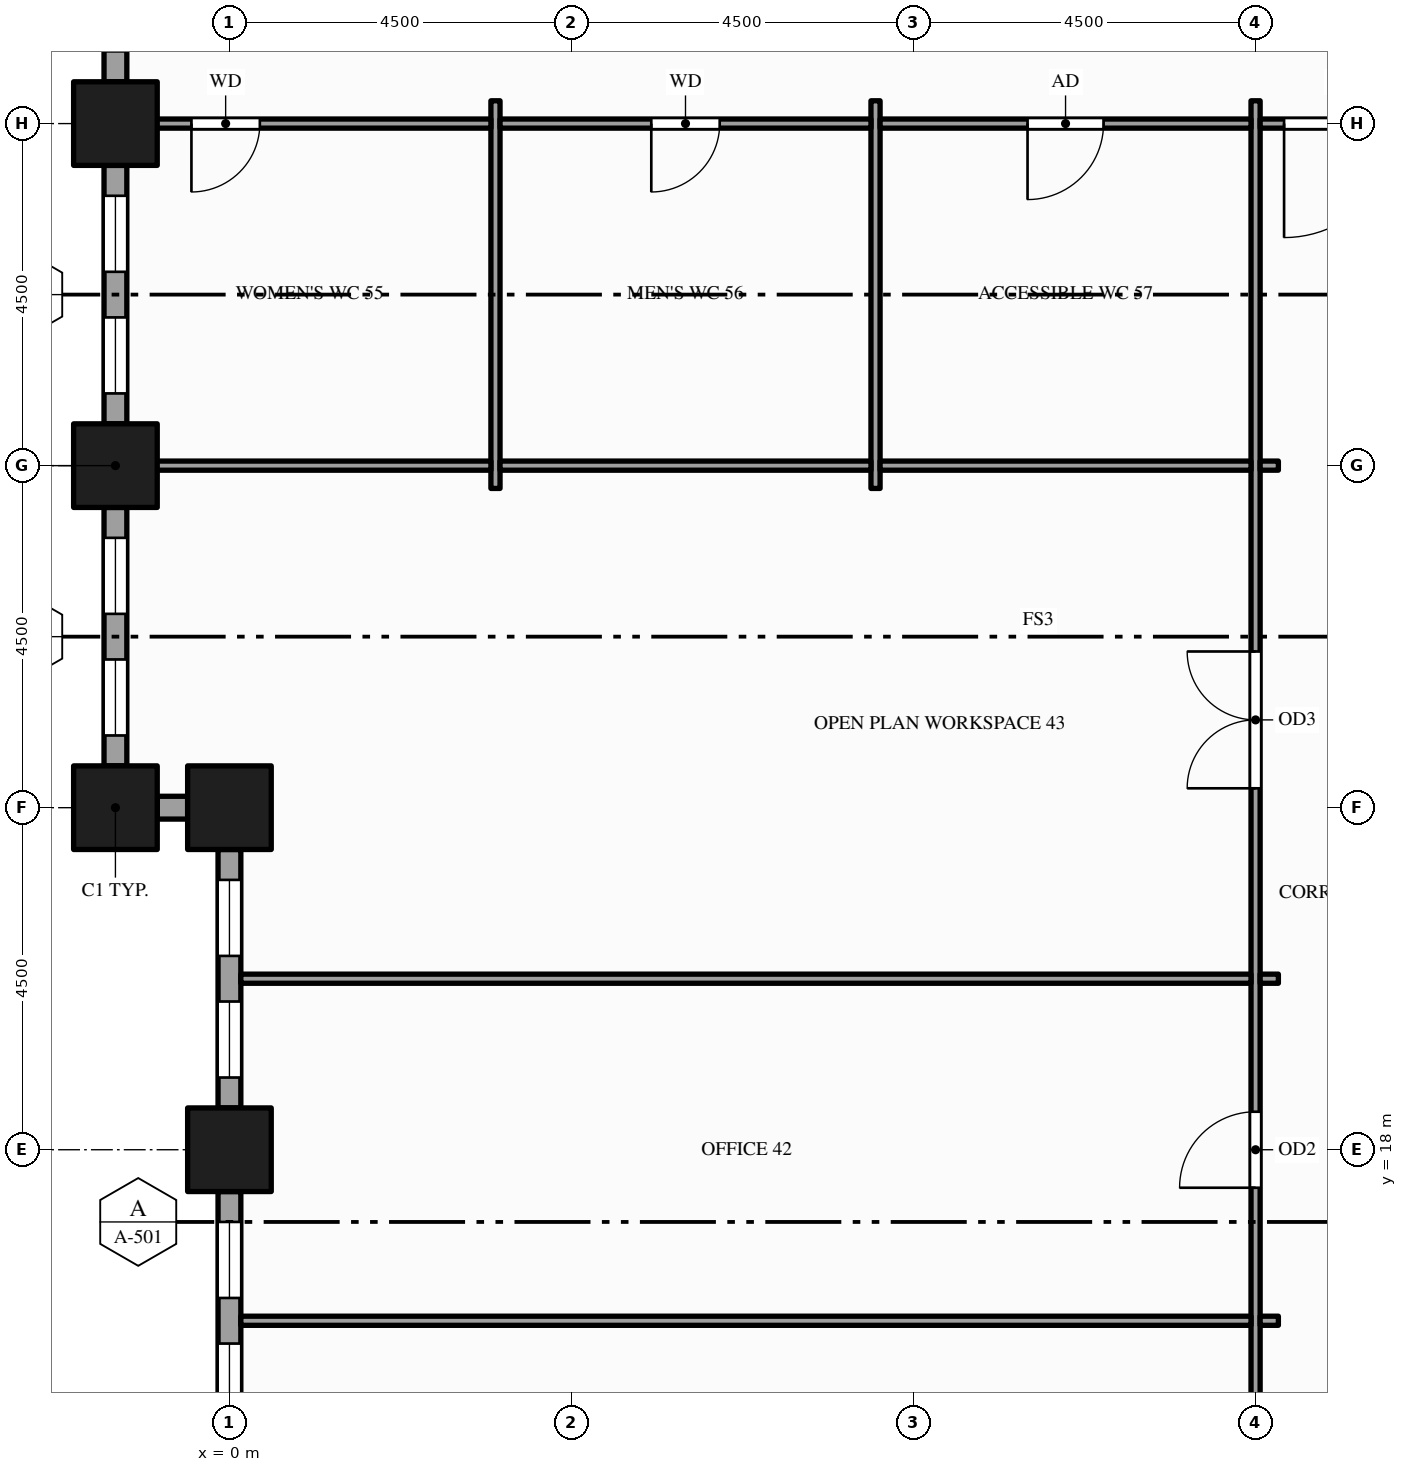
"""IFC4 building model, lengths in metres.
Left out: names, types, materials, properties, quantities, classifications, styles, units other than length and angle.
Written with IfcOpenShell. Run it as: python <this file> out.ifc"""

import sys

from ifc_helpers import new_model, si_unit, direction, frame, frame_2d, origin, origin_2d, place, context, subcontext, project, spatial, rectangle, hollow_rectangle, extrude, element, fill, save


model = new_model("IFC4")
c1 = context("Model", 3, precision=1e-05, world=origin(), true_north=direction((0.0, 1.0)))
c2 = subcontext(c1, "Body", "Model", "MODEL_VIEW")
j1 = project(units=[si_unit("LENGTHUNIT", "METRE"), si_unit("PLANEANGLEUNIT", "RADIAN")], contexts=[c1])
p1 = place(None, origin())
s1 = spatial("IfcSite", under=j1, at=p1, CompositionType="ELEMENT")
p2 = place(p1, origin())
s2 = spatial("IfcBuilding", under=s1, at=p2, CompositionType="ELEMENT")
p3 = place(p2, frame((0.0, 0.0, 61.0)))
s3 = spatial("IfcBuildingStorey", under=s2, at=p3, CompositionType="ELEMENT", Elevation=61.0)
for number, where, z_axis, x_axis in (
    (1, (-1.5, 22.5, -0.15), (0.0, 0.0, 1.0), (1.0, 0.0, 0.0)),
    (2, (-1.5, 27.0, -0.15), (0.0, 0.0, 1.0), (1.0, 0.0, 0.0)),
    (3, (-1.5, 31.5, -0.15), (0.0, 0.0, 1.0), (1.0, 0.0, 0.0)),
    (4, (0.0, 18.0, -0.15), (0.0, 0.0, 1.0), (1.0, 0.0, 0.0)),
    (5, (0.0, 22.5, -0.15), (0.0, 0.0, 1.0), (1.0, 0.0, 0.0)),
):
    element("IfcColumn", number, at=place(p3, frame(where, z_axis=z_axis, x_axis=x_axis)), inside=s3, PredefinedType="COLUMN", context=c2, shape_type="SweptSolid", body=[
        extrude(hollow_rectangle(XDim=1.1, YDim=1.1, WallThickness=0.06, at=origin_2d()), origin(), (0.0, 0.0, 1.0), 4.0),
    ])
p4 = place(p3, frame((-1.5, 35.45, 0.0), z_axis=(0.0, 0.0, 1.0), x_axis=(0.0, -1.0, 0.0)))
e6 = element("IfcWall", 6, at=p4, inside=s3, PredefinedType="STANDARD", context=c2, shape_type="SweptSolid", body=[
    extrude(rectangle(XDim=3.4, YDim=0.3, at=frame_2d((1.7, 0.0))), origin(), (0.0, 0.0, 1.0), 3.144),
])
p5 = place(p4, frame((0.4, 0.0, 0.9)))
e7 = element("IfcOpeningElement", 7, at=p5, cuts=e6, PredefinedType="OPENING", context=c2, shape_type="SweptSolid", body=[
    extrude(rectangle(XDim=1.0, YDim=2.0, at=frame_2d((0.5, 1.0))), frame((0.0, 0.16, 0.0), z_axis=(0.0, -1.0, 0.0), x_axis=(1.0, 0.0, 0.0)), (0.0, 0.0, 1.0), 0.32),
])
p6 = place(p4, frame((2.0, 0.0, 0.9)))
e8 = element("IfcOpeningElement", 8, at=p6, cuts=e6, PredefinedType="OPENING", context=c2, shape_type="SweptSolid", body=[
    extrude(rectangle(XDim=1.0, YDim=2.0, at=frame_2d((0.5, 1.0))), frame((0.0, 0.16, 0.0), z_axis=(0.0, -1.0, 0.0), x_axis=(1.0, 0.0, 0.0)), (0.0, 0.0, 1.0), 0.32),
])
p7 = place(p3, frame((-1.5, 30.95, 0.0), z_axis=(0.0, 0.0, 1.0), x_axis=(0.0, -1.0, 0.0)))
e9 = element("IfcWall", 9, at=p7, inside=s3, PredefinedType="STANDARD", context=c2, shape_type="SweptSolid", body=[
    extrude(rectangle(XDim=3.4, YDim=0.3, at=frame_2d((1.7, 0.0))), origin(), (0.0, 0.0, 1.0), 3.144),
])
p8 = place(p7, frame((0.4, 0.0, 0.9)))
e10 = element("IfcOpeningElement", 10, at=p8, cuts=e9, PredefinedType="OPENING", context=c2, shape_type="SweptSolid", body=[
    extrude(rectangle(XDim=1.0, YDim=2.0, at=frame_2d((0.5, 1.0))), frame((0.0, 0.16, 0.0), z_axis=(0.0, -1.0, 0.0), x_axis=(1.0, 0.0, 0.0)), (0.0, 0.0, 1.0), 0.32),
])
p9 = place(p7, frame((2.0, 0.0, 0.9)))
e11 = element("IfcOpeningElement", 11, at=p9, cuts=e9, PredefinedType="OPENING", context=c2, shape_type="SweptSolid", body=[
    extrude(rectangle(XDim=1.0, YDim=2.0, at=frame_2d((0.5, 1.0))), frame((0.0, 0.16, 0.0), z_axis=(0.0, -1.0, 0.0), x_axis=(1.0, 0.0, 0.0)), (0.0, 0.0, 1.0), 0.32),
])
p10 = place(p3, frame((-1.5, 26.45, 0.0), z_axis=(0.0, 0.0, 1.0), x_axis=(0.0, -1.0, 0.0)))
e12 = element("IfcWall", 12, at=p10, inside=s3, PredefinedType="STANDARD", context=c2, shape_type="SweptSolid", body=[
    extrude(rectangle(XDim=3.4, YDim=0.3, at=frame_2d((1.7, 0.0))), origin(), (0.0, 0.0, 1.0), 3.144),
])
p11 = place(p10, frame((0.4, 0.0, 0.9)))
e13 = element("IfcOpeningElement", 13, at=p11, cuts=e12, PredefinedType="OPENING", context=c2, shape_type="SweptSolid", body=[
    extrude(rectangle(XDim=1.0, YDim=2.0, at=frame_2d((0.5, 1.0))), frame((0.0, 0.16, 0.0), z_axis=(0.0, -1.0, 0.0), x_axis=(1.0, 0.0, 0.0)), (0.0, 0.0, 1.0), 0.32),
])
p12 = place(p10, frame((2.0, 0.0, 0.9)))
e14 = element("IfcOpeningElement", 14, at=p12, cuts=e12, PredefinedType="OPENING", context=c2, shape_type="SweptSolid", body=[
    extrude(rectangle(XDim=1.0, YDim=2.0, at=frame_2d((0.5, 1.0))), frame((0.0, 0.16, 0.0), z_axis=(0.0, -1.0, 0.0), x_axis=(1.0, 0.0, 0.0)), (0.0, 0.0, 1.0), 0.32),
])
p13 = place(p3, frame((-0.95, 22.5, 0.0), z_axis=(0.0, 0.0, 1.0), x_axis=(1.0, 0.0, 0.0)))
e15 = element("IfcWall", 15, at=p13, inside=s3, PredefinedType="STANDARD", context=c2, shape_type="SweptSolid", body=[
    extrude(rectangle(XDim=0.4, YDim=0.3, at=frame_2d((0.2, 0.0))), origin(), (0.0, 0.0, 1.0), 3.144),
])
p14 = place(p3, frame((0.0, 21.95, 0.0), z_axis=(0.0, 0.0, 1.0), x_axis=(0.0, -1.0, 0.0)))
e16 = element("IfcWall", 16, at=p14, inside=s3, PredefinedType="STANDARD", context=c2, shape_type="SweptSolid", body=[
    extrude(rectangle(XDim=3.4, YDim=0.3, at=frame_2d((1.7, 0.0))), origin(), (0.0, 0.0, 1.0), 3.144),
])
p15 = place(p14, frame((0.4, 0.0, 0.9)))
e17 = element("IfcOpeningElement", 17, at=p15, cuts=e16, PredefinedType="OPENING", context=c2, shape_type="SweptSolid", body=[
    extrude(rectangle(XDim=1.0, YDim=2.0, at=frame_2d((0.5, 1.0))), frame((0.0, 0.16, 0.0), z_axis=(0.0, -1.0, 0.0), x_axis=(1.0, 0.0, 0.0)), (0.0, 0.0, 1.0), 0.32),
])
p16 = place(p14, frame((2.0, 0.0, 0.9)))
e18 = element("IfcOpeningElement", 18, at=p16, cuts=e16, PredefinedType="OPENING", context=c2, shape_type="SweptSolid", body=[
    extrude(rectangle(XDim=1.0, YDim=2.0, at=frame_2d((0.5, 1.0))), frame((0.0, 0.16, 0.0), z_axis=(0.0, -1.0, 0.0), x_axis=(1.0, 0.0, 0.0)), (0.0, 0.0, 1.0), 0.32),
])
p17 = place(p3, frame((0.0, 17.45, 0.0), z_axis=(0.0, 0.0, 1.0), x_axis=(0.0, -1.0, 0.0)))
e19 = element("IfcWall", 19, at=p17, inside=s3, PredefinedType="STANDARD", context=c2, shape_type="SweptSolid", body=[
    extrude(rectangle(XDim=3.4, YDim=0.3, at=frame_2d((1.7, 0.0))), origin(), (0.0, 0.0, 1.0), 3.144),
])
p18 = place(p17, frame((0.4, 0.0, 0.9)))
e20 = element("IfcOpeningElement", 20, at=p18, cuts=e19, PredefinedType="OPENING", context=c2, shape_type="SweptSolid", body=[
    extrude(rectangle(XDim=1.0, YDim=2.0, at=frame_2d((0.5, 1.0))), frame((0.0, 0.16, 0.0), z_axis=(0.0, -1.0, 0.0), x_axis=(1.0, 0.0, 0.0)), (0.0, 0.0, 1.0), 0.32),
])
p19 = place(p17, frame((2.0, 0.0, 0.9)))
e21 = element("IfcOpeningElement", 21, at=p19, cuts=e19, PredefinedType="OPENING", context=c2, shape_type="SweptSolid", body=[
    extrude(rectangle(XDim=1.0, YDim=2.0, at=frame_2d((0.5, 1.0))), frame((0.0, 0.16, 0.0), z_axis=(0.0, -1.0, 0.0), x_axis=(1.0, 0.0, 0.0)), (0.0, 0.0, 1.0), 0.32),
])
for number, where, z_axis, x_axis in (
    (22, (3.5, 26.7, 0.0), (0.0, 0.0, 1.0), (0.0, 1.0, 0.0)),
    (23, (8.5, 26.7, 0.0), (0.0, 0.0, 1.0), (0.0, 1.0, 0.0)),
):
    element("IfcWall", number, at=place(p3, frame(where, z_axis=z_axis, x_axis=x_axis)), inside=s3, PredefinedType="PARTITIONING", context=c2, shape_type="SweptSolid", body=[
        extrude(rectangle(XDim=5.1, YDim=0.12, at=frame_2d((2.55, 0.0))), origin(), (0.0, 0.0, 1.0), 3.85),
    ])
p20 = place(p3, frame((13.5, 10.95, 0.0), z_axis=(0.0, 0.0, 1.0), x_axis=(0.0, 1.0, 0.0)))
e24 = element("IfcWall", 24, at=p20, inside=s3, PredefinedType="PARTITIONING", context=c2, shape_type="SweptSolid", body=[
    extrude(rectangle(XDim=20.85, YDim=0.12, at=frame_2d((10.425, 0.0))), origin(), (0.0, 0.0, 1.0), 2.6),
])
p21 = place(p20, frame((2.05, 0.0, 0.0)))
e25 = element("IfcOpeningElement", 25, at=p21, cuts=e24, PredefinedType="OPENING", context=c2, shape_type="SweptSolid", body=[
    extrude(rectangle(XDim=1.0, YDim=2.1, at=frame_2d((0.5, 1.05))), frame((0.0, 0.07, 0.0), z_axis=(0.0, -1.0, 0.0), x_axis=(1.0, 0.0, 0.0)), (0.0, 0.0, 1.0), 0.14),
])
p22 = place(p20, frame((6.55, 0.0, 0.0)))
e26 = element("IfcOpeningElement", 26, at=p22, cuts=e24, PredefinedType="OPENING", context=c2, shape_type="SweptSolid", body=[
    extrude(rectangle(XDim=1.0, YDim=2.1, at=frame_2d((0.5, 1.05))), frame((0.0, 0.07, 0.0), z_axis=(0.0, -1.0, 0.0), x_axis=(1.0, 0.0, 0.0)), (0.0, 0.0, 1.0), 0.14),
])
p23 = place(p20, frame((11.805, 0.0, 0.0)))
e27 = element("IfcOpeningElement", 27, at=p23, cuts=e24, PredefinedType="OPENING", context=c2, shape_type="SweptSolid", body=[
    extrude(rectangle(XDim=1.8, YDim=2.1, at=frame_2d((0.9, 1.05))), frame((0.0, 0.07, 0.0), z_axis=(0.0, -1.0, 0.0), x_axis=(1.0, 0.0, 0.0)), (0.0, 0.0, 1.0), 0.14),
])
p24 = place(p3, frame((0.15, 15.75, 0.0), z_axis=(0.0, 0.0, 1.0), x_axis=(1.0, 0.0, 0.0)))
e28 = element("IfcWall", 28, at=p24, inside=s3, PredefinedType="PARTITIONING", context=c2, shape_type="SweptSolid", body=[
    extrude(rectangle(XDim=13.29, YDim=0.12, at=frame_2d((6.645, 0.0))), origin(), (0.0, 0.0, 1.0), 2.938),
])
p25 = place(p3, frame((13.56, 15.75, 0.0), z_axis=(0.0, 0.0, 1.0), x_axis=(1.0, 0.0, 0.0)))
e29 = element("IfcWall", 29, at=p25, inside=s3, PredefinedType="PARTITIONING", context=c2, shape_type="SweptSolid", body=[
    extrude(rectangle(XDim=0.24, YDim=0.12, at=frame_2d((0.12, 0.0))), origin(), (0.0, 0.0, 1.0), 2.938),
])
p26 = place(p3, frame((0.15, 20.25, 0.0), z_axis=(0.0, 0.0, 1.0), x_axis=(1.0, 0.0, 0.0)))
e30 = element("IfcWall", 30, at=p26, inside=s3, PredefinedType="PARTITIONING", context=c2, shape_type="SweptSolid", body=[
    extrude(rectangle(XDim=13.29, YDim=0.12, at=frame_2d((6.645, 0.0))), origin(), (0.0, 0.0, 1.0), 2.938),
])
p27 = place(p3, frame((13.56, 20.25, 0.0), z_axis=(0.0, 0.0, 1.0), x_axis=(1.0, 0.0, 0.0)))
e31 = element("IfcWall", 31, at=p27, inside=s3, PredefinedType="PARTITIONING", context=c2, shape_type="SweptSolid", body=[
    extrude(rectangle(XDim=0.24, YDim=0.12, at=frame_2d((0.12, 0.0))), origin(), (0.0, 0.0, 1.0), 2.938),
])
p28 = place(p3, frame((-1.35, 27.0, 0.0), z_axis=(0.0, 0.0, 1.0), x_axis=(1.0, 0.0, 0.0)))
e32 = element("IfcWall", 32, at=p28, inside=s3, PredefinedType="PARTITIONING", context=c2, shape_type="SweptSolid", body=[
    extrude(rectangle(XDim=4.79, YDim=0.12, at=frame_2d((2.395, 0.0))), origin(), (0.0, 0.0, 1.0), 2.938),
])
for number, where, z_axis, x_axis in (
    (33, (3.56, 27.0, 0.0), (0.0, 0.0, 1.0), (1.0, 0.0, 0.0)),
    (34, (8.56, 27.0, 0.0), (0.0, 0.0, 1.0), (1.0, 0.0, 0.0)),
):
    element("IfcWall", number, at=place(p3, frame(where, z_axis=z_axis, x_axis=x_axis)), inside=s3, PredefinedType="PARTITIONING", context=c2, shape_type="SweptSolid", body=[
        extrude(rectangle(XDim=4.88, YDim=0.12, at=frame_2d((2.44, 0.0))), origin(), (0.0, 0.0, 1.0), 2.938),
    ])
p29 = place(p3, frame((13.56, 27.0, 0.0), z_axis=(0.0, 0.0, 1.0), x_axis=(1.0, 0.0, 0.0)))
e35 = element("IfcWall", 35, at=p29, inside=s3, PredefinedType="PARTITIONING", context=c2, shape_type="SweptSolid", body=[
    extrude(rectangle(XDim=0.24, YDim=0.12, at=frame_2d((0.12, 0.0))), origin(), (0.0, 0.0, 1.0), 2.938),
])
p30 = place(p3, frame((-1.35, 31.5, 0.0), z_axis=(0.0, 0.0, 1.0), x_axis=(1.0, 0.0, 0.0)))
e36 = element("IfcWall", 36, at=p30, inside=s3, PredefinedType="PARTITIONING", context=c2, shape_type="SweptSolid", body=[
    extrude(rectangle(XDim=4.79, YDim=0.12, at=frame_2d((2.395, 0.0))), origin(), (0.0, 0.0, 1.0), 2.938),
])
p31 = place(p30, frame((0.85, 0.0, 0.0)))
e37 = element("IfcOpeningElement", 37, at=p31, cuts=e36, PredefinedType="OPENING", context=c2, shape_type="SweptSolid", body=[
    extrude(rectangle(XDim=0.9, YDim=2.1, at=frame_2d((0.45, 1.05))), frame((0.0, 0.07, 0.0), z_axis=(0.0, -1.0, 0.0), x_axis=(1.0, 0.0, 0.0)), (0.0, 0.0, 1.0), 0.14),
])
p32 = place(p3, frame((3.56, 31.5, 0.0), z_axis=(0.0, 0.0, 1.0), x_axis=(1.0, 0.0, 0.0)))
e38 = element("IfcWall", 38, at=p32, inside=s3, PredefinedType="PARTITIONING", context=c2, shape_type="SweptSolid", body=[
    extrude(rectangle(XDim=4.88, YDim=0.12, at=frame_2d((2.44, 0.0))), origin(), (0.0, 0.0, 1.0), 2.938),
])
p33 = place(p32, frame((1.99, 0.0, 0.0)))
e39 = element("IfcOpeningElement", 39, at=p33, cuts=e38, PredefinedType="OPENING", context=c2, shape_type="SweptSolid", body=[
    extrude(rectangle(XDim=0.9, YDim=2.1, at=frame_2d((0.45, 1.05))), frame((0.0, 0.07, 0.0), z_axis=(0.0, -1.0, 0.0), x_axis=(1.0, 0.0, 0.0)), (0.0, 0.0, 1.0), 0.14),
])
p34 = place(p3, frame((8.56, 31.5, 0.0), z_axis=(0.0, 0.0, 1.0), x_axis=(1.0, 0.0, 0.0)))
e40 = element("IfcWall", 40, at=p34, inside=s3, PredefinedType="PARTITIONING", context=c2, shape_type="SweptSolid", body=[
    extrude(rectangle(XDim=4.88, YDim=0.12, at=frame_2d((2.44, 0.0))), origin(), (0.0, 0.0, 1.0), 2.938),
])
p35 = place(p34, frame((1.94, 0.0, 0.0)))
e41 = element("IfcOpeningElement", 41, at=p35, cuts=e40, PredefinedType="OPENING", context=c2, shape_type="SweptSolid", body=[
    extrude(rectangle(XDim=1.0, YDim=2.1, at=frame_2d((0.5, 1.05))), frame((0.0, 0.07, 0.0), z_axis=(0.0, -1.0, 0.0), x_axis=(1.0, 0.0, 0.0)), (0.0, 0.0, 1.0), 0.14),
])
p36 = place(p3, frame((13.56, 31.5, 0.0), z_axis=(0.0, 0.0, 1.0), x_axis=(1.0, 0.0, 0.0)))
e42 = element("IfcWall", 42, at=p36, inside=s3, PredefinedType="PARTITIONING", context=c2, shape_type="SweptSolid", body=[
    extrude(rectangle(XDim=2.13, YDim=0.12, at=frame_2d((1.065, 0.0))), origin(), (0.0, 0.0, 1.0), 2.938),
])
p37 = place(p36, frame((0.315, 0.0, 0.0)))
e43 = element("IfcOpeningElement", 43, at=p37, cuts=e42, PredefinedType="OPENING", context=c2, shape_type="SweptSolid", body=[
    extrude(rectangle(XDim=1.5, YDim=2.1, at=frame_2d((0.75, 1.05))), frame((0.0, 0.07, 0.0), z_axis=(0.0, -1.0, 0.0), x_axis=(1.0, 0.0, 0.0)), (0.0, 0.0, 1.0), 0.14),
])
p38 = place(p8, origin())
e44 = element("IfcWindow", 44, at=p38, inside=s3, PartitioningType="SINGLE_PANEL", PredefinedType="WINDOW", context=c2, shape_type="SweptSolid", body=[
    extrude(rectangle(XDim=1.0, YDim=2.0, at=frame_2d((0.5, 1.0))), frame((0.0, 0.03, 0.0), z_axis=(0.0, -1.0, 0.0), x_axis=(1.0, 0.0, 0.0)), (0.0, 0.0, 1.0), 0.06),
])
fill(e10, e44)
p39 = place(p9, origin())
e45 = element("IfcWindow", 45, at=p39, inside=s3, PartitioningType="SINGLE_PANEL", PredefinedType="WINDOW", context=c2, shape_type="SweptSolid", body=[
    extrude(rectangle(XDim=1.0, YDim=2.0, at=frame_2d((0.5, 1.0))), frame((0.0, 0.03, 0.0), z_axis=(0.0, -1.0, 0.0), x_axis=(1.0, 0.0, 0.0)), (0.0, 0.0, 1.0), 0.06),
])
fill(e11, e45)
p40 = place(p11, origin())
e46 = element("IfcWindow", 46, at=p40, inside=s3, PartitioningType="SINGLE_PANEL", PredefinedType="WINDOW", context=c2, shape_type="SweptSolid", body=[
    extrude(rectangle(XDim=1.0, YDim=2.0, at=frame_2d((0.5, 1.0))), frame((0.0, 0.03, 0.0), z_axis=(0.0, -1.0, 0.0), x_axis=(1.0, 0.0, 0.0)), (0.0, 0.0, 1.0), 0.06),
])
fill(e13, e46)
p41 = place(p12, origin())
e47 = element("IfcWindow", 47, at=p41, inside=s3, PartitioningType="SINGLE_PANEL", PredefinedType="WINDOW", context=c2, shape_type="SweptSolid", body=[
    extrude(rectangle(XDim=1.0, YDim=2.0, at=frame_2d((0.5, 1.0))), frame((0.0, 0.03, 0.0), z_axis=(0.0, -1.0, 0.0), x_axis=(1.0, 0.0, 0.0)), (0.0, 0.0, 1.0), 0.06),
])
fill(e14, e47)
p42 = place(p15, origin())
e48 = element("IfcWindow", 48, at=p42, inside=s3, PartitioningType="SINGLE_PANEL", PredefinedType="WINDOW", context=c2, shape_type="SweptSolid", body=[
    extrude(rectangle(XDim=1.0, YDim=2.0, at=frame_2d((0.5, 1.0))), frame((0.0, 0.03, 0.0), z_axis=(0.0, -1.0, 0.0), x_axis=(1.0, 0.0, 0.0)), (0.0, 0.0, 1.0), 0.06),
])
fill(e17, e48)
p43 = place(p16, origin())
e49 = element("IfcWindow", 49, at=p43, inside=s3, PartitioningType="SINGLE_PANEL", PredefinedType="WINDOW", context=c2, shape_type="SweptSolid", body=[
    extrude(rectangle(XDim=1.0, YDim=2.0, at=frame_2d((0.5, 1.0))), frame((0.0, 0.03, 0.0), z_axis=(0.0, -1.0, 0.0), x_axis=(1.0, 0.0, 0.0)), (0.0, 0.0, 1.0), 0.06),
])
fill(e18, e49)
p44 = place(p18, origin())
e50 = element("IfcWindow", 50, at=p44, inside=s3, PartitioningType="SINGLE_PANEL", PredefinedType="WINDOW", context=c2, shape_type="SweptSolid", body=[
    extrude(rectangle(XDim=1.0, YDim=2.0, at=frame_2d((0.5, 1.0))), frame((0.0, 0.03, 0.0), z_axis=(0.0, -1.0, 0.0), x_axis=(1.0, 0.0, 0.0)), (0.0, 0.0, 1.0), 0.06),
])
fill(e20, e50)
p45 = place(p19, origin())
e51 = element("IfcWindow", 51, at=p45, inside=s3, PartitioningType="SINGLE_PANEL", PredefinedType="WINDOW", context=c2, shape_type="SweptSolid", body=[
    extrude(rectangle(XDim=1.0, YDim=2.0, at=frame_2d((0.5, 1.0))), frame((0.0, 0.03, 0.0), z_axis=(0.0, -1.0, 0.0), x_axis=(1.0, 0.0, 0.0)), (0.0, 0.0, 1.0), 0.06),
])
fill(e21, e51)
p46 = place(p37, origin())
e52 = element("IfcDoor", 52, at=p46, inside=s3, OperationType="SINGLE_SWING_LEFT", PredefinedType="DOOR", context=c2, shape_type="SweptSolid", body=[
    extrude(rectangle(XDim=1.5, YDim=2.1, at=frame_2d((0.75, 1.05))), frame((0.0, 0.025, 0.0), z_axis=(0.0, -1.0, 0.0), x_axis=(1.0, 0.0, 0.0)), (0.0, 0.0, 1.0), 0.05),
])
fill(e43, e52)
p47 = place(p22, origin())
e53 = element("IfcDoor", 53, at=p47, inside=s3, OperationType="SINGLE_SWING_LEFT", PredefinedType="DOOR", context=c2, shape_type="SweptSolid", body=[
    extrude(rectangle(XDim=1.0, YDim=2.1, at=frame_2d((0.5, 1.05))), frame((0.0, 0.025, 0.0), z_axis=(0.0, -1.0, 0.0), x_axis=(1.0, 0.0, 0.0)), (0.0, 0.0, 1.0), 0.05),
])
fill(e26, e53)
p48 = place(p23, origin())
e54 = element("IfcDoor", 54, at=p48, inside=s3, OperationType="DOUBLE_DOOR_SINGLE_SWING", PredefinedType="DOOR", context=c2, shape_type="SweptSolid", body=[
    extrude(rectangle(XDim=1.8, YDim=2.1, at=frame_2d((0.9, 1.05))), frame((0.0, 0.025, 0.0), z_axis=(0.0, -1.0, 0.0), x_axis=(1.0, 0.0, 0.0)), (0.0, 0.0, 1.0), 0.05),
])
fill(e27, e54)
p49 = place(p31, origin())
e55 = element("IfcDoor", 55, at=p49, inside=s3, OperationType="SINGLE_SWING_LEFT", PredefinedType="DOOR", context=c2, shape_type="SweptSolid", body=[
    extrude(rectangle(XDim=0.9, YDim=2.1, at=frame_2d((0.45, 1.05))), frame((0.0, 0.025, 0.0), z_axis=(0.0, -1.0, 0.0), x_axis=(1.0, 0.0, 0.0)), (0.0, 0.0, 1.0), 0.05),
])
fill(e37, e55)
p50 = place(p33, origin())
e56 = element("IfcDoor", 56, at=p50, inside=s3, OperationType="SINGLE_SWING_LEFT", PredefinedType="DOOR", context=c2, shape_type="SweptSolid", body=[
    extrude(rectangle(XDim=0.9, YDim=2.1, at=frame_2d((0.45, 1.05))), frame((0.0, 0.025, 0.0), z_axis=(0.0, -1.0, 0.0), x_axis=(1.0, 0.0, 0.0)), (0.0, 0.0, 1.0), 0.05),
])
fill(e39, e56)
p51 = place(p35, origin())
e57 = element("IfcDoor", 57, at=p51, inside=s3, OperationType="SINGLE_SWING_LEFT", PredefinedType="DOOR", context=c2, shape_type="SweptSolid", body=[
    extrude(rectangle(XDim=1.0, YDim=2.1, at=frame_2d((0.5, 1.05))), frame((0.0, 0.025, 0.0), z_axis=(0.0, -1.0, 0.0), x_axis=(1.0, 0.0, 0.0)), (0.0, 0.0, 1.0), 0.05),
])
fill(e41, e57)
save(model, sys.argv[1])
